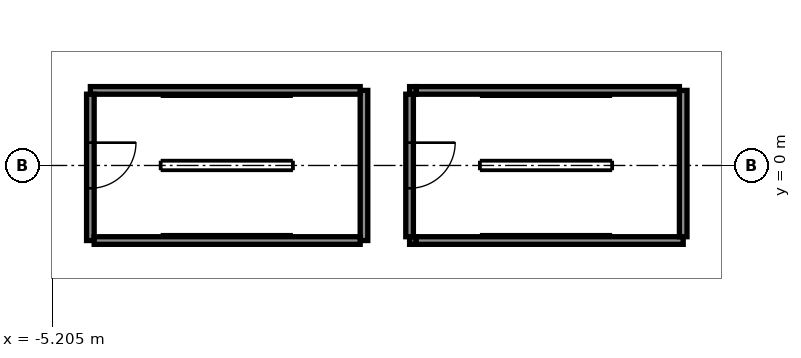
"""IFC4 building model, lengths in metres.
Left out: names, types, materials, properties, quantities, classifications, styles, units other than length and angle.
Written with IfcOpenShell. Run it as: python <this file> out.ifc"""

import sys

from ifc_helpers import new_model, si_unit, direction, frame, frame_2d, origin, place, context, subcontext, project, spatial, rectangle, extrude, element, fill, save


model = new_model("IFC4")
c1 = context("Model", 3, precision=1e-05, world=origin(), true_north=direction((0.0, 1.0)))
c2 = subcontext(c1, "Body", "Model", "MODEL_VIEW")
j1 = project(units=[si_unit("LENGTHUNIT", "METRE"), si_unit("PLANEANGLEUNIT", "RADIAN")], contexts=[c1])
p1 = place(None, origin())
s1 = spatial("IfcSite", under=j1, at=p1, CompositionType="ELEMENT")
p2 = place(p1, origin())
s2 = spatial("IfcBuilding", under=s1, at=p2, CompositionType="ELEMENT")
p3 = place(p2, frame((0.0, 0.0, 7.0)))
s3 = spatial("IfcBuildingStorey", under=s2, at=p3, CompositionType="ELEMENT", Elevation=7.0)
p4 = place(p3, frame((4.2, -1.975, 0.0), z_axis=(0.0, 0.0, 1.0), x_axis=(1.0, 0.0, 0.0)))
e1 = element("IfcWall", 1, at=p4, inside=s3, PredefinedType="SOLIDWALL", context=c2, shape_type="SweptSolid", body=[
    extrude(rectangle(XDim=0.173, YDim=0.2, at=frame_2d((0.086, 0.0))), origin(), (0.0, 0.0, 1.0), 3.762),
])
p5 = place(p3, frame((4.373, -1.975, 0.0), z_axis=(0.0, 0.0, 1.0), x_axis=(1.0, 0.0, 0.0)))
e2 = element("IfcWall", 2, at=p5, inside=s3, PredefinedType="SOLIDWALL", context=c2, shape_type="SweptSolid", body=[
    extrude(rectangle(XDim=7.027, YDim=0.2, at=frame_2d((3.514, 0.0))), origin(), (0.0, 0.0, 1.0), 4.7),
])
p6 = place(p3, frame((11.4, -1.875, 0.0), z_axis=(0.0, 0.0, 1.0), x_axis=(0.0, 1.0, 0.0)))
e3 = element("IfcWall", 3, at=p6, inside=s3, PredefinedType="SOLIDWALL", context=c2, shape_type="SweptSolid", body=[
    extrude(rectangle(XDim=3.85, YDim=0.2, at=frame_2d((1.925, 0.0))), origin(), (0.0, 0.0, 1.0), 4.7),
])
p7 = place(p3, frame((11.3, 1.975, 0.0), z_axis=(0.0, 0.0, 1.0), x_axis=(-1.0, 0.0, 0.0)))
e4 = element("IfcWall", 4, at=p7, inside=s3, PredefinedType="SOLIDWALL", context=c2, shape_type="SweptSolid", body=[
    extrude(rectangle(XDim=6.927, YDim=0.2, at=frame_2d((3.464, 0.0))), origin(), (0.0, 0.0, 1.0), 4.7),
])
p8 = place(p3, frame((4.373, 1.975, 0.0), z_axis=(0.0, 0.0, 1.0), x_axis=(-1.0, 0.0, 0.0)))
e5 = element("IfcWall", 5, at=p8, inside=s3, PredefinedType="SOLIDWALL", context=c2, shape_type="SweptSolid", body=[
    extrude(rectangle(XDim=0.173, YDim=0.2, at=frame_2d((0.086, 0.0))), origin(), (0.0, 0.0, 1.0), 3.762),
])
p9 = place(p3, frame((4.2, 1.875, 0.0), z_axis=(0.0, 0.0, 1.0), x_axis=(0.0, -1.0, 0.0)))
e6 = element("IfcWall", 6, at=p9, inside=s3, PredefinedType="SOLIDWALL", context=c2, shape_type="SweptSolid", body=[
    extrude(rectangle(XDim=3.75, YDim=0.2, at=frame_2d((1.875, 0.0))), origin(), (0.0, 0.0, 1.0), 3.762),
])
p10 = place(p9, frame((1.275, 0.0, 0.0)))
e7 = element("IfcOpeningElement", 7, at=p10, cuts=e6, PredefinedType="OPENING", context=c2, shape_type="SweptSolid", body=[
    extrude(rectangle(XDim=1.2, YDim=2.1, at=frame_2d((0.6, 1.05))), frame((0.0, 0.11, 0.0), z_axis=(0.0, -1.0, 0.0), x_axis=(1.0, 0.0, 0.0)), (0.0, 0.0, 1.0), 0.22),
])
p11 = place(p3, frame((3.0, -1.975, 0.0), z_axis=(0.0, 0.0, 1.0), x_axis=(0.0, 1.0, 0.0)))
e8 = element("IfcWall", 8, at=p11, inside=s3, PredefinedType="SOLIDWALL", context=c2, shape_type="SweptSolid", body=[
    extrude(rectangle(XDim=3.95, YDim=0.2, at=frame_2d((1.975, 0.0))), origin(), (0.0, 0.0, 1.0), 4.7),
])
p12 = place(p3, frame((2.9, 1.975, 0.0), z_axis=(0.0, 0.0, 1.0), x_axis=(-1.0, 0.0, 0.0)))
e9 = element("IfcWall", 9, at=p12, inside=s3, PredefinedType="SOLIDWALL", context=c2, shape_type="SweptSolid", body=[
    extrude(rectangle(XDim=7.1, YDim=0.2, at=frame_2d((3.55, 0.0))), origin(), (0.0, 0.0, 1.0), 4.7),
])
p13 = place(p3, frame((-4.2, 1.875, 0.0), z_axis=(0.0, 0.0, 1.0), x_axis=(0.0, -1.0, 0.0)))
e10 = element("IfcWall", 10, at=p13, inside=s3, PredefinedType="SOLIDWALL", context=c2, shape_type="SweptSolid", body=[
    extrude(rectangle(XDim=3.85, YDim=0.2, at=frame_2d((1.925, 0.0))), origin(), (0.0, 0.0, 1.0), 4.7),
])
p14 = place(p13, frame((1.275, 0.0, 0.0)))
e11 = element("IfcOpeningElement", 11, at=p14, cuts=e10, PredefinedType="OPENING", context=c2, shape_type="SweptSolid", body=[
    extrude(rectangle(XDim=1.2, YDim=2.1, at=frame_2d((0.6, 1.05))), frame((0.0, 0.11, 0.0), z_axis=(0.0, -1.0, 0.0), x_axis=(1.0, 0.0, 0.0)), (0.0, 0.0, 1.0), 0.22),
])
p15 = place(p3, frame((-4.1, -1.975, 0.0), z_axis=(0.0, 0.0, 1.0), x_axis=(1.0, 0.0, 0.0)))
e12 = element("IfcWall", 12, at=p15, inside=s3, PredefinedType="SOLIDWALL", context=c2, shape_type="SweptSolid", body=[
    extrude(rectangle(XDim=7.0, YDim=0.2, at=frame_2d((3.5, 0.0))), origin(), (0.0, 0.0, 1.0), 4.7),
])
p16 = place(p10, frame((1.2, 0.0, 0.0), z_axis=(0.0, 0.0, 1.0), x_axis=(-1.0, 0.0, 0.0)))
e13 = element("IfcDoor", 13, at=p16, inside=s3, OperationType="SINGLE_SWING_LEFT", PredefinedType="DOOR", context=c2, shape_type="SweptSolid", body=[
    extrude(rectangle(XDim=1.2, YDim=2.1, at=frame_2d((0.6, 1.05))), frame((0.0, 0.025, 0.0), z_axis=(0.0, -1.0, 0.0), x_axis=(1.0, 0.0, 0.0)), (0.0, 0.0, 1.0), 0.05),
])
fill(e7, e13)
p17 = place(p14, frame((1.2, 0.0, 0.0), z_axis=(0.0, 0.0, 1.0), x_axis=(-1.0, 0.0, 0.0)))
e14 = element("IfcDoor", 14, at=p17, inside=s3, OperationType="SINGLE_SWING_LEFT", PredefinedType="DOOR", context=c2, shape_type="SweptSolid", body=[
    extrude(rectangle(XDim=1.2, YDim=2.1, at=frame_2d((0.6, 1.05))), frame((0.0, 0.025, 0.0), z_axis=(0.0, -1.0, 0.0), x_axis=(1.0, 0.0, 0.0)), (0.0, 0.0, 1.0), 0.05),
])
fill(e11, e14)
save(model, sys.argv[1])
